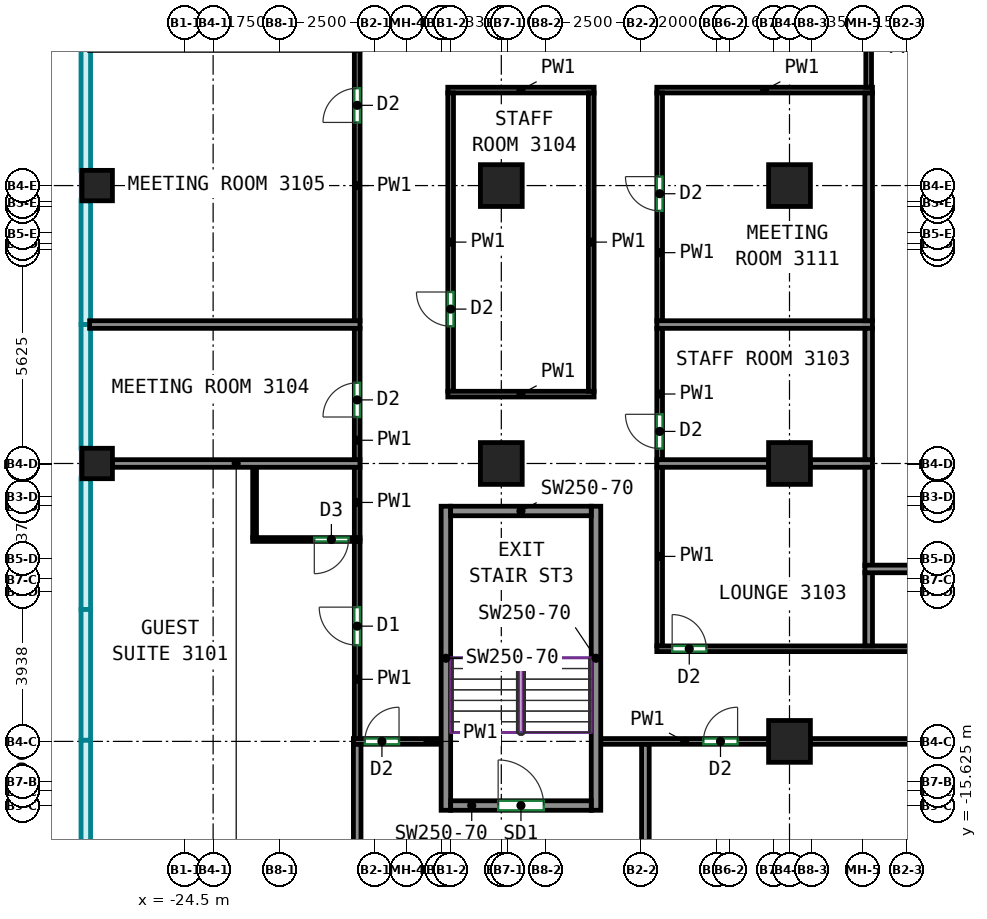
"""IFC4 building model, lengths in metres.
Left out: names, types, materials, properties, quantities, classifications, styles, units other than length and angle.
Written with IfcOpenShell. Run it as: python <this file> out.ifc"""

import sys

from ifc_helpers import new_model, si_unit, direction, frame, frame_2d, origin, origin_2d, place, context, subcontext, project, spatial, rectangle, extrude, source, transform, mapped, element, fill, save


model = new_model("IFC4")
c1 = context("Model", 3, precision=1e-05, world=origin(), true_north=direction((0.0, 1.0)))
c2 = subcontext(c1, "Body", "Model", "MODEL_VIEW")
j1 = project(units=[si_unit("LENGTHUNIT", "METRE"), si_unit("PLANEANGLEUNIT", "RADIAN")], contexts=[c1])
p1 = place(None, origin())
s1 = spatial("IfcSite", under=j1, at=p1, CompositionType="ELEMENT")
p2 = place(p1, origin())
s2 = spatial("IfcBuilding", under=s1, at=p2, CompositionType="ELEMENT")
p3 = place(p2, frame((0.0, 0.0, 138.5)))
s3 = spatial("IfcBuildingStorey", under=s2, at=p3, CompositionType="ELEMENT", Elevation=138.5)
m1 = source(origin(), c2, "Body", "SweptSolid", [
    extrude(rectangle(XDim=0.8, YDim=0.8, at=origin_2d()), origin(), (0.0, 0.0, 1.0), 5.12),
])
for number, where, z_axis, x_axis in (
    (1, (-26.8, -6.625, 0.0), (0.0, 0.0, 1.0), (1.0, 0.0, 0.0)),
    (2, (-26.8, 0.688, 0.0), (0.0, 0.0, 1.0), (1.0, 0.0, 0.0)),
):
    element("IfcColumn", number, at=place(p3, frame(where, z_axis=z_axis, x_axis=x_axis)), inside=s3, PredefinedType="COLUMN", context=c2, shape_type="MappedRepresentation", body=[
        mapped(m1, transform((0.0, 0.0, 0.0))),
    ])
m2 = source(origin(), c2, "Body", "SweptSolid", [
    extrude(rectangle(XDim=1.1, YDim=1.1, at=origin_2d()), origin(), (0.0, 0.0, 1.0), 5.12),
])
for number, where, z_axis, x_axis in (
    (3, (-16.167, -6.625, 0.0), (0.0, 0.0, 1.0), (1.0, 0.0, 0.0)),
    (4, (-16.167, 0.688, 0.0), (0.0, 0.0, 1.0), (1.0, 0.0, 0.0)),
    (5, (-8.583, -13.938, 0.0), (0.0, 0.0, 1.0), (1.0, 0.0, 0.0)),
    (6, (-8.583, -6.625, 0.0), (0.0, 0.0, 1.0), (1.0, 0.0, 0.0)),
    (7, (-8.583, 0.688, 0.0), (0.0, 0.0, 1.0), (1.0, 0.0, 0.0)),
):
    element("IfcColumn", number, at=place(p3, frame(where, z_axis=z_axis, x_axis=x_axis)), inside=s3, PredefinedType="COLUMN", context=c2, shape_type="MappedRepresentation", body=[
        mapped(m2, transform((0.0, 0.0, 0.0))),
    ])
m3 = source(origin(), c2, "Body", "SweptSolid", [
    extrude(rectangle(XDim=8.0, YDim=0.25, at=frame_2d((4.0, 0.0))), origin(), (0.0, 0.0, 1.0), 5.12),
])
for number, where, z_axis, x_axis in (
    (8, (-17.625, -15.75, 0.0), (0.0, 0.0, 1.0), (0.0, 1.0, 0.0)),
    (9, (-13.675, -15.75, 0.0), (0.0, 0.0, 1.0), (0.0, 1.0, 0.0)),
):
    element("IfcWall", number, at=place(p3, frame(where, z_axis=z_axis, x_axis=x_axis)), inside=s3, PredefinedType="SHEAR", context=c2, shape_type="MappedRepresentation", body=[
        mapped(m3, transform((0.0, 0.0, 0.0))),
    ])
m4 = source(origin(), c2, "Body", "SweptSolid", [
    extrude(rectangle(XDim=3.7, YDim=0.25, at=frame_2d((1.85, 0.0))), origin(), (0.0, 0.0, 1.0), 5.12),
])
p4 = place(p3, frame((-17.5, -15.625, 0.0), z_axis=(0.0, 0.0, 1.0), x_axis=(1.0, 0.0, 0.0)))
e10 = element("IfcWall", 10, at=p4, inside=s3, PredefinedType="SHEAR", context=c2, shape_type="MappedRepresentation", body=[
    mapped(m4, transform((0.0, 0.0, 0.0))),
])
p5 = place(p4, frame((1.25, 0.0, 0.0)))
e11 = element("IfcOpeningElement", 11, at=p5, cuts=e10, PredefinedType="OPENING", context=c2, shape_type="SweptSolid", body=[
    extrude(rectangle(XDim=1.2, YDim=2.1, at=frame_2d((0.6, 1.05))), frame((0.0, 0.135, 0.0), z_axis=(0.0, -1.0, 0.0), x_axis=(1.0, 0.0, 0.0)), (0.0, 0.0, 1.0), 0.27),
])
p6 = place(p3, frame((-17.5, -7.875, 0.0), z_axis=(0.0, 0.0, 1.0), x_axis=(1.0, 0.0, 0.0)))
e12 = element("IfcWall", 12, at=p6, inside=s3, PredefinedType="SHEAR", context=c2, shape_type="MappedRepresentation", body=[
    mapped(m4, transform((0.0, 0.0, 0.0))),
])
p7 = place(p3, frame((-13.55, -13.938, 0.0), z_axis=(0.0, 0.0, 1.0), x_axis=(1.0, 0.0, 0.0)))
e13 = element("IfcWall", 13, at=p7, inside=s3, PredefinedType="PARTITIONING", context=c2, shape_type="SweptSolid", body=[
    extrude(rectangle(XDim=4.417, YDim=0.15, at=frame_2d((2.208, 0.0))), origin(), (0.0, 0.0, 1.0), 5.12),
])
p8 = place(p7, frame((2.701, 0.0, 0.0)))
e14 = element("IfcOpeningElement", 14, at=p8, cuts=e13, PredefinedType="OPENING", context=c2, shape_type="SweptSolid", body=[
    extrude(rectangle(XDim=0.9, YDim=2.1, at=frame_2d((0.45, 1.05))), frame((0.0, 0.085, 0.0), z_axis=(0.0, -1.0, 0.0), x_axis=(1.0, 0.0, 0.0)), (0.0, 0.0, 1.0), 0.17),
])
p9 = place(p3, frame((-20.059, -13.938, 0.0), z_axis=(0.0, 0.0, 1.0), x_axis=(1.0, 0.0, 0.0)))
e15 = element("IfcWall", 15, at=p9, inside=s3, PredefinedType="PARTITIONING", context=c2, shape_type="SweptSolid", body=[
    extrude(rectangle(XDim=2.309, YDim=0.15, at=frame_2d((1.155, 0.0))), origin(), (0.0, 0.0, 1.0), 5.12),
])
p10 = place(p9, frame((0.301, 0.0, 0.0)))
e16 = element("IfcOpeningElement", 16, at=p10, cuts=e15, PredefinedType="OPENING", context=c2, shape_type="SweptSolid", body=[
    extrude(rectangle(XDim=0.9, YDim=2.1, at=frame_2d((0.45, 1.05))), frame((0.0, 0.085, 0.0), z_axis=(0.0, -1.0, 0.0), x_axis=(1.0, 0.0, 0.0)), (0.0, 0.0, 1.0), 0.17),
])
p11 = place(p3, frame((-8.033, -13.938, 0.0), z_axis=(0.0, 0.0, 1.0), x_axis=(1.0, 0.0, 0.0)))
e17 = element("IfcWall", 17, at=p11, inside=s3, PredefinedType="PARTITIONING", context=c2, shape_type="SweptSolid", body=[
    extrude(rectangle(XDim=6.483, YDim=0.15, at=frame_2d((3.241, 0.0))), origin(), (0.0, 0.0, 1.0), 5.12),
])
p12 = place(p3, frame((-19.959, -13.863, 0.0), z_axis=(0.0, 0.0, 1.0), x_axis=(0.0, 1.0, 0.0)))
e18 = element("IfcWall", 18, at=p12, inside=s3, PredefinedType="PARTITIONING", context=c2, shape_type="SweptSolid", body=[
    extrude(rectangle(XDim=5.198, YDim=0.15, at=frame_2d((2.599, 0.0))), origin(), (0.0, 0.0, 1.0), 5.12),
])
p13 = place(p12, frame((2.458, 0.0, 0.0)))
e19 = element("IfcOpeningElement", 19, at=p13, cuts=e18, PredefinedType="OPENING", context=c2, shape_type="SweptSolid", body=[
    extrude(rectangle(XDim=1.0, YDim=2.1, at=frame_2d((0.5, 1.05))), frame((0.0, 0.085, 0.0), z_axis=(0.0, -1.0, 0.0), x_axis=(1.0, 0.0, 0.0)), (0.0, 0.0, 1.0), 0.17),
])
p14 = place(p3, frame((-19.959, -8.585, 0.0), z_axis=(0.0, 0.0, 1.0), x_axis=(0.0, 1.0, 0.0)))
e20 = element("IfcWall", 20, at=p14, inside=s3, PredefinedType="PARTITIONING", context=c2, shape_type="SweptSolid", body=[
    extrude(rectangle(XDim=1.87, YDim=0.15, at=frame_2d((0.935, 0.0))), origin(), (0.0, 0.0, 1.0), 5.12),
])
p15 = place(p3, frame((-19.959, -6.535, 0.0), z_axis=(0.0, 0.0, 1.0), x_axis=(0.0, 1.0, 0.0)))
e21 = element("IfcWall", 21, at=p15, inside=s3, PredefinedType="PARTITIONING", context=c2, shape_type="SweptSolid", body=[
    extrude(rectangle(XDim=3.476, YDim=0.15, at=frame_2d((1.738, 0.0))), origin(), (0.0, 0.0, 1.0), 5.12),
])
p16 = place(p15, frame((1.133, 0.0, 0.0)))
e22 = element("IfcOpeningElement", 22, at=p16, cuts=e21, PredefinedType="OPENING", context=c2, shape_type="SweptSolid", body=[
    extrude(rectangle(XDim=0.9, YDim=2.1, at=frame_2d((0.45, 1.05))), frame((0.0, 0.085, 0.0), z_axis=(0.0, -1.0, 0.0), x_axis=(1.0, 0.0, 0.0)), (0.0, 0.0, 1.0), 0.17),
])
p17 = place(p3, frame((-19.959, -2.879, 0.0), z_axis=(0.0, 0.0, 1.0), x_axis=(0.0, 1.0, 0.0)))
e23 = element("IfcWall", 23, at=p17, inside=s3, PredefinedType="PARTITIONING", context=c2, shape_type="SweptSolid", body=[
    extrude(rectangle(XDim=7.133, YDim=0.15, at=frame_2d((3.566, 0.0))), origin(), (0.0, 0.0, 1.0), 5.12),
])
p18 = place(p17, frame((5.228, 0.0, 0.0)))
e24 = element("IfcOpeningElement", 24, at=p18, cuts=e23, PredefinedType="OPENING", context=c2, shape_type="SweptSolid", body=[
    extrude(rectangle(XDim=0.9, YDim=2.1, at=frame_2d((0.45, 1.05))), frame((0.0, 0.085, 0.0), z_axis=(0.0, -1.0, 0.0), x_axis=(1.0, 0.0, 0.0)), (0.0, 0.0, 1.0), 0.17),
])
p19 = place(p3, frame((-12.0, -11.425, 0.0), z_axis=(0.0, 0.0, 1.0), x_axis=(0.0, 1.0, 0.0)))
e25 = element("IfcWall", 25, at=p19, inside=s3, PredefinedType="PARTITIONING", context=c2, shape_type="SweptSolid", body=[
    extrude(rectangle(XDim=4.71, YDim=0.15, at=frame_2d((2.355, 0.0))), origin(), (0.0, 0.0, 1.0), 5.12),
])
p20 = place(p3, frame((-12.075, -11.5, 0.0), z_axis=(0.0, 0.0, 1.0), x_axis=(1.0, 0.0, 0.0)))
e26 = element("IfcWall", 26, at=p20, inside=s3, PredefinedType="PARTITIONING", context=c2, shape_type="SweptSolid", body=[
    extrude(rectangle(XDim=28.35, YDim=0.15, at=frame_2d((14.175, 0.0))), origin(), (0.0, 0.0, 1.0), 5.12),
])
p21 = place(p20, frame((0.404, 0.0, 0.0)))
e27 = element("IfcOpeningElement", 27, at=p21, cuts=e26, PredefinedType="OPENING", context=c2, shape_type="SweptSolid", body=[
    extrude(rectangle(XDim=0.9, YDim=2.1, at=frame_2d((0.45, 1.05))), frame((0.0, 0.085, 0.0), z_axis=(0.0, -1.0, 0.0), x_axis=(1.0, 0.0, 0.0)), (0.0, 0.0, 1.0), 0.17),
])
p22 = place(p20, frame((13.176, 0.0, 0.0)))
e28 = element("IfcOpeningElement", 28, at=p22, cuts=e26, PredefinedType="OPENING", context=c2, shape_type="SweptSolid", body=[
    extrude(rectangle(XDim=1.0, YDim=2.1, at=frame_2d((0.5, 1.05))), frame((0.0, 0.085, 0.0), z_axis=(0.0, -1.0, 0.0), x_axis=(1.0, 0.0, 0.0)), (0.0, 0.0, 1.0), 0.17),
])
p23 = place(p3, frame((-12.0, -6.535, 0.0), z_axis=(0.0, 0.0, 1.0), x_axis=(0.0, 1.0, 0.0)))
e29 = element("IfcWall", 29, at=p23, inside=s3, PredefinedType="PARTITIONING", context=c2, shape_type="SweptSolid", body=[
    extrude(rectangle(XDim=3.476, YDim=0.15, at=frame_2d((1.738, 0.0))), origin(), (0.0, 0.0, 1.0), 5.12),
])
p24 = place(p23, frame((0.304, 0.0, 0.0)))
e30 = element("IfcOpeningElement", 30, at=p24, cuts=e29, PredefinedType="OPENING", context=c2, shape_type="SweptSolid", body=[
    extrude(rectangle(XDim=0.9, YDim=2.1, at=frame_2d((0.45, 1.05))), frame((0.0, 0.085, 0.0), z_axis=(0.0, -1.0, 0.0), x_axis=(1.0, 0.0, 0.0)), (0.0, 0.0, 1.0), 0.17),
])
p25 = place(p3, frame((-12.075, 3.2, 0.0), z_axis=(0.0, 0.0, 1.0), x_axis=(1.0, 0.0, 0.0)))
e31 = element("IfcWall", 31, at=p25, inside=s3, PredefinedType="PARTITIONING", context=c2, shape_type="SweptSolid", body=[
    extrude(rectangle(XDim=5.675, YDim=0.15, at=frame_2d((2.837, 0.0))), origin(), (0.0, 0.0, 1.0), 5.12),
])
p26 = place(p3, frame((-12.0, -2.879, 0.0), z_axis=(0.0, 0.0, 1.0), x_axis=(0.0, 1.0, 0.0)))
e32 = element("IfcWall", 32, at=p26, inside=s3, PredefinedType="PARTITIONING", context=c2, shape_type="SweptSolid", body=[
    extrude(rectangle(XDim=6.004, YDim=0.15, at=frame_2d((3.002, 0.0))), origin(), (0.0, 0.0, 1.0), 5.12),
])
p27 = place(p26, frame((2.902, 0.0, 0.0)))
e33 = element("IfcOpeningElement", 33, at=p27, cuts=e32, PredefinedType="OPENING", context=c2, shape_type="SweptSolid", body=[
    extrude(rectangle(XDim=0.9, YDim=2.1, at=frame_2d((0.45, 1.05))), frame((0.0, 0.085, 0.0), z_axis=(0.0, -1.0, 0.0), x_axis=(1.0, 0.0, 0.0)), (0.0, 0.0, 1.0), 0.17),
])
p28 = place(p3, frame((-17.575, 3.2, 0.0), z_axis=(0.0, 0.0, 1.0), x_axis=(1.0, 0.0, 0.0)))
e34 = element("IfcWall", 34, at=p28, inside=s3, PredefinedType="PARTITIONING", context=c2, shape_type="SweptSolid", body=[
    extrude(rectangle(XDim=3.85, YDim=0.15, at=frame_2d((1.925, 0.0))), origin(), (0.0, 0.0, 1.0), 5.12),
])
p29 = place(p3, frame((-17.5, -4.725, 0.0), z_axis=(0.0, 0.0, 1.0), x_axis=(0.0, 1.0, 0.0)))
e35 = element("IfcWall", 35, at=p29, inside=s3, PredefinedType="PARTITIONING", context=c2, shape_type="SweptSolid", body=[
    extrude(rectangle(XDim=7.85, YDim=0.15, at=frame_2d((3.925, 0.0))), origin(), (0.0, 0.0, 1.0), 5.12),
])
p30 = place(p29, frame((1.712, 0.0, 0.0)))
e36 = element("IfcOpeningElement", 36, at=p30, cuts=e35, PredefinedType="OPENING", context=c2, shape_type="SweptSolid", body=[
    extrude(rectangle(XDim=0.9, YDim=2.1, at=frame_2d((0.45, 1.05))), frame((0.0, 0.085, 0.0), z_axis=(0.0, -1.0, 0.0), x_axis=(1.0, 0.0, 0.0)), (0.0, 0.0, 1.0), 0.17),
])
p31 = place(p3, frame((-13.725, -4.8, 0.0), z_axis=(0.0, 0.0, 1.0), x_axis=(-1.0, 0.0, 0.0)))
e37 = element("IfcWall", 37, at=p31, inside=s3, PredefinedType="PARTITIONING", context=c2, shape_type="SweptSolid", body=[
    extrude(rectangle(XDim=3.85, YDim=0.15, at=frame_2d((1.925, 0.0))), origin(), (0.0, 0.0, 1.0), 5.12),
])
p32 = place(p3, frame((-13.8, 3.125, 0.0), z_axis=(0.0, 0.0, 1.0), x_axis=(0.0, -1.0, 0.0)))
e38 = element("IfcWall", 38, at=p32, inside=s3, PredefinedType="PARTITIONING", context=c2, shape_type="SweptSolid", body=[
    extrude(rectangle(XDim=7.85, YDim=0.15, at=frame_2d((3.925, 0.0))), origin(), (0.0, 0.0, 1.0), 5.12),
])
p33 = place(p3, frame((-6.5, 3.275, 0.0), z_axis=(0.0, 0.0, 1.0), x_axis=(0.0, 1.0, 0.0)))
e39 = element("IfcWall", 39, at=p33, inside=s3, PredefinedType="PARTITIONING", context=c2, shape_type="SweptSolid", body=[
    extrude(rectangle(XDim=2.075, YDim=0.15, at=frame_2d((1.038, 0.0))), origin(), (0.0, 0.0, 1.0), 5.12),
])
for number, where, z_axis, x_axis in (
    (40, (-12.375, -21.0, 0.0), (0.0, 0.0, 1.0), (0.0, 1.0, 0.0)),
    (41, (-19.959, -21.0, 0.0), (0.0, 0.0, 1.0), (0.0, 1.0, 0.0)),
):
    element("IfcWall", number, at=place(p3, frame(where, z_axis=z_axis, x_axis=x_axis)), inside=s3, PredefinedType="PARTITIONING", context=c2, shape_type="SweptSolid", body=[
        extrude(rectangle(XDim=6.985, YDim=0.2, at=frame_2d((3.493, 0.0))), origin(), (0.0, 0.0, 1.0), 5.12),
    ])
p34 = place(p3, frame((-22.659, -8.575, 0.0), z_axis=(0.0, 0.0, 1.0), x_axis=(0.0, 1.0, 0.0)))
e42 = element("IfcWall", 42, at=p34, inside=s3, PredefinedType="PARTITIONING", context=c2, shape_type="SweptSolid", body=[
    extrude(rectangle(XDim=1.85, YDim=0.1, at=frame_2d((0.925, 0.0))), origin(), (0.0, 0.0, 1.0), 5.12),
])
p35 = place(p3, frame((-19.886, -8.625, 0.0), z_axis=(0.0, 0.0, 1.0), x_axis=(-1.0, 0.0, 0.0)))
e43 = element("IfcWall", 43, at=p35, inside=s3, PredefinedType="PARTITIONING", context=c2, shape_type="SweptSolid", body=[
    extrude(rectangle(XDim=2.823, YDim=0.1, at=frame_2d((1.412, 0.0))), origin(), (0.0, 0.0, 1.0), 5.12),
])
p36 = place(p35, frame((0.302, 0.0, 0.0)))
e44 = element("IfcOpeningElement", 44, at=p36, cuts=e43, PredefinedType="OPENING", context=c2, shape_type="SweptSolid", body=[
    extrude(rectangle(XDim=0.9, YDim=2.1, at=frame_2d((0.45, 1.05))), frame((0.0, 0.06, 0.0), z_axis=(0.0, -1.0, 0.0), x_axis=(1.0, 0.0, 0.0)), (0.0, 0.0, 1.0), 0.12),
])
p37 = place(p3, frame((-26.4, -6.625, 0.0), z_axis=(0.0, 0.0, 1.0), x_axis=(1.0, 0.0, 0.0)))
e45 = element("IfcWall", 45, at=p37, inside=s3, PredefinedType="PARTITIONING", context=c2, shape_type="SweptSolid", body=[
    extrude(rectangle(XDim=6.514, YDim=0.2, at=frame_2d((3.257, 0.0))), origin(), (0.0, 0.0, 1.0), 4.52),
])
p38 = place(p3, frame((-27.0, -2.969, 0.0), z_axis=(0.0, 0.0, 1.0), x_axis=(1.0, 0.0, 0.0)))
e46 = element("IfcWall", 46, at=p38, inside=s3, PredefinedType="PARTITIONING", context=c2, shape_type="SweptSolid", body=[
    extrude(rectangle(XDim=7.114, YDim=0.2, at=frame_2d((3.557, 0.0))), origin(), (0.0, 0.0, 1.0), 5.12),
])
p39 = place(p3, frame((-12.073, -6.625, 0.0), z_axis=(0.0, 0.0, 1.0), x_axis=(1.0, 0.0, 0.0)))
e47 = element("IfcWall", 47, at=p39, inside=s3, PredefinedType="PARTITIONING", context=c2, shape_type="SweptSolid", body=[
    extrude(rectangle(XDim=2.94, YDim=0.2, at=frame_2d((1.47, 0.0))), origin(), (0.0, 0.0, 1.0), 5.12),
])
p40 = place(p3, frame((-8.033, -6.625, 0.0), z_axis=(0.0, 0.0, 1.0), x_axis=(1.0, 0.0, 0.0)))
e48 = element("IfcWall", 48, at=p40, inside=s3, PredefinedType="PARTITIONING", context=c2, shape_type="SweptSolid", body=[
    extrude(rectangle(XDim=1.633, YDim=0.2, at=frame_2d((0.816, 0.0))), origin(), (0.0, 0.0, 1.0), 5.12),
])
p41 = place(p3, frame((-6.5, -11.423, 0.0), z_axis=(0.0, 0.0, 1.0), x_axis=(0.0, 1.0, 0.0)))
e49 = element("IfcWall", 49, at=p41, inside=s3, PredefinedType="PARTITIONING", context=c2, shape_type="SweptSolid", body=[
    extrude(rectangle(XDim=1.933, YDim=0.2, at=frame_2d((0.967, 0.0))), origin(), (0.0, 0.0, 1.0), 5.12),
])
p42 = place(p3, frame((-6.5, -9.31, 0.0), z_axis=(0.0, 0.0, 1.0), x_axis=(0.0, 1.0, 0.0)))
e50 = element("IfcWall", 50, at=p42, inside=s3, PredefinedType="PARTITIONING", context=c2, shape_type="SweptSolid", body=[
    extrude(rectangle(XDim=2.585, YDim=0.2, at=frame_2d((1.292, 0.0))), origin(), (0.0, 0.0, 1.0), 5.12),
])
p43 = place(p3, frame((-12.073, -2.969, 0.0), z_axis=(0.0, 0.0, 1.0), x_axis=(1.0, 0.0, 0.0)))
e51 = element("IfcWall", 51, at=p43, inside=s3, PredefinedType="PARTITIONING", context=c2, shape_type="SweptSolid", body=[
    extrude(rectangle(XDim=5.673, YDim=0.2, at=frame_2d((2.836, 0.0))), origin(), (0.0, 0.0, 1.0), 5.12),
])
p44 = place(p3, frame((-6.5, -6.525, 0.0), z_axis=(0.0, 0.0, 1.0), x_axis=(0.0, 1.0, 0.0)))
e52 = element("IfcWall", 52, at=p44, inside=s3, PredefinedType="PARTITIONING", context=c2, shape_type="SweptSolid", body=[
    extrude(rectangle(XDim=3.456, YDim=0.2, at=frame_2d((1.728, 0.0))), origin(), (0.0, 0.0, 1.0), 5.12),
])
p45 = place(p3, frame((-6.5, -2.869, 0.0), z_axis=(0.0, 0.0, 1.0), x_axis=(0.0, 1.0, 0.0)))
e53 = element("IfcWall", 53, at=p45, inside=s3, PredefinedType="PARTITIONING", context=c2, shape_type="SweptSolid", body=[
    extrude(rectangle(XDim=5.992, YDim=0.2, at=frame_2d((2.996, 0.0))), origin(), (0.0, 0.0, 1.0), 5.12),
])
p46 = place(p3, frame((8.6, -9.4, 0.0), z_axis=(0.0, 0.0, 1.0), x_axis=(-1.0, 0.0, 0.0)))
e54 = element("IfcWall", 54, at=p46, inside=s3, PredefinedType="PARTITIONING", context=c2, shape_type="SweptSolid", body=[
    extrude(rectangle(XDim=15.2, YDim=0.2, at=frame_2d((7.6, 0.0))), origin(), (0.0, 0.0, 1.0), 5.12),
])
p47 = place(p5, origin())
e55 = element("IfcDoor", 55, at=p47, inside=s3, OperationType="DOUBLE_DOOR_SINGLE_SWING", PredefinedType="DOOR", context=c2, shape_type="SweptSolid", body=[
    extrude(rectangle(XDim=1.2, YDim=2.1, at=frame_2d((0.6, 1.05))), frame((0.0, 0.025, 0.0), z_axis=(0.0, -1.0, 0.0), x_axis=(1.0, 0.0, 0.0)), (0.0, 0.0, 1.0), 0.05),
])
fill(e11, e55)
p48 = place(p10, origin())
e56 = element("IfcDoor", 56, at=p48, inside=s3, OperationType="SINGLE_SWING_RIGHT", PredefinedType="DOOR", context=c2, shape_type="SweptSolid", body=[
    extrude(rectangle(XDim=0.9, YDim=2.1, at=frame_2d((0.45, 1.05))), frame((0.0, 0.025, 0.0), z_axis=(0.0, -1.0, 0.0), x_axis=(1.0, 0.0, 0.0)), (0.0, 0.0, 1.0), 0.05),
])
fill(e16, e56)
p49 = place(p8, origin())
e57 = element("IfcDoor", 57, at=p49, inside=s3, OperationType="SINGLE_SWING_RIGHT", PredefinedType="DOOR", context=c2, shape_type="SweptSolid", body=[
    extrude(rectangle(XDim=0.9, YDim=2.1, at=frame_2d((0.45, 1.05))), frame((0.0, 0.025, 0.0), z_axis=(0.0, -1.0, 0.0), x_axis=(1.0, 0.0, 0.0)), (0.0, 0.0, 1.0), 0.05),
])
fill(e14, e57)
p50 = place(p21, origin())
e58 = element("IfcDoor", 58, at=p50, inside=s3, OperationType="SINGLE_SWING_LEFT", PredefinedType="DOOR", context=c2, shape_type="SweptSolid", body=[
    extrude(rectangle(XDim=0.9, YDim=2.1, at=frame_2d((0.45, 1.05))), frame((0.0, 0.025, 0.0), z_axis=(0.0, -1.0, 0.0), x_axis=(1.0, 0.0, 0.0)), (0.0, 0.0, 1.0), 0.05),
])
fill(e27, e58)
p51 = place(p13, origin())
e59 = element("IfcDoor", 59, at=p51, inside=s3, OperationType="SINGLE_SWING_RIGHT", PredefinedType="DOOR", context=c2, shape_type="SweptSolid", body=[
    extrude(rectangle(XDim=1.0, YDim=2.1, at=frame_2d((0.5, 1.05))), frame((0.0, 0.025, 0.0), z_axis=(0.0, -1.0, 0.0), x_axis=(1.0, 0.0, 0.0)), (0.0, 0.0, 1.0), 0.05),
])
fill(e19, e59)
p52 = place(p36, origin())
e60 = element("IfcDoor", 60, at=p52, inside=s3, OperationType="SINGLE_SWING_RIGHT", PredefinedType="DOOR", context=c2, shape_type="SweptSolid", body=[
    extrude(rectangle(XDim=0.9, YDim=2.1, at=frame_2d((0.45, 1.05))), frame((0.0, 0.025, 0.0), z_axis=(0.0, -1.0, 0.0), x_axis=(1.0, 0.0, 0.0)), (0.0, 0.0, 1.0), 0.05),
])
fill(e44, e60)
p53 = place(p24, origin())
e61 = element("IfcDoor", 61, at=p53, inside=s3, OperationType="SINGLE_SWING_RIGHT", PredefinedType="DOOR", context=c2, shape_type="SweptSolid", body=[
    extrude(rectangle(XDim=0.9, YDim=2.1, at=frame_2d((0.45, 1.05))), frame((0.0, 0.025, 0.0), z_axis=(0.0, -1.0, 0.0), x_axis=(1.0, 0.0, 0.0)), (0.0, 0.0, 1.0), 0.05),
])
fill(e30, e61)
p54 = place(p16, origin())
e62 = element("IfcDoor", 62, at=p54, inside=s3, OperationType="SINGLE_SWING_LEFT", PredefinedType="DOOR", context=c2, shape_type="SweptSolid", body=[
    extrude(rectangle(XDim=0.9, YDim=2.1, at=frame_2d((0.45, 1.05))), frame((0.0, 0.025, 0.0), z_axis=(0.0, -1.0, 0.0), x_axis=(1.0, 0.0, 0.0)), (0.0, 0.0, 1.0), 0.05),
])
fill(e22, e62)
p55 = place(p30, origin())
e63 = element("IfcDoor", 63, at=p55, inside=s3, OperationType="SINGLE_SWING_RIGHT", PredefinedType="DOOR", context=c2, shape_type="SweptSolid", body=[
    extrude(rectangle(XDim=0.9, YDim=2.1, at=frame_2d((0.45, 1.05))), frame((0.0, 0.025, 0.0), z_axis=(0.0, -1.0, 0.0), x_axis=(1.0, 0.0, 0.0)), (0.0, 0.0, 1.0), 0.05),
])
fill(e36, e63)
p56 = place(p27, origin())
e64 = element("IfcDoor", 64, at=p56, inside=s3, OperationType="SINGLE_SWING_RIGHT", PredefinedType="DOOR", context=c2, shape_type="SweptSolid", body=[
    extrude(rectangle(XDim=0.9, YDim=2.1, at=frame_2d((0.45, 1.05))), frame((0.0, 0.025, 0.0), z_axis=(0.0, -1.0, 0.0), x_axis=(1.0, 0.0, 0.0)), (0.0, 0.0, 1.0), 0.05),
])
fill(e33, e64)
p57 = place(p18, origin())
e65 = element("IfcDoor", 65, at=p57, inside=s3, OperationType="SINGLE_SWING_LEFT", PredefinedType="DOOR", context=c2, shape_type="SweptSolid", body=[
    extrude(rectangle(XDim=0.9, YDim=2.1, at=frame_2d((0.45, 1.05))), frame((0.0, 0.025, 0.0), z_axis=(0.0, -1.0, 0.0), x_axis=(1.0, 0.0, 0.0)), (0.0, 0.0, 1.0), 0.05),
])
fill(e24, e65)
save(model, sys.argv[1])
